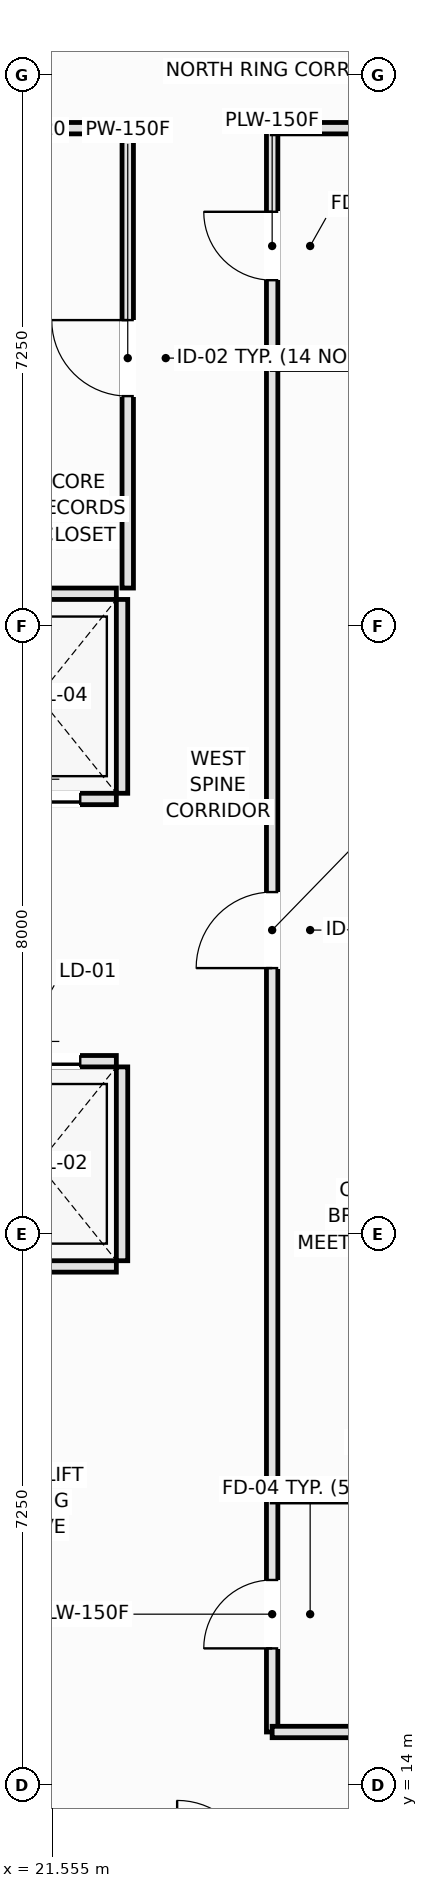
"""IFC4 building model, lengths in metres.
Left out: names, types, materials, properties, quantities, classifications, styles, units other than length and angle.
Written with IfcOpenShell. Run it as: python <this file> out.ifc"""

import sys

from ifc_helpers import new_model, si_unit, direction, frame, frame_2d, origin, place, context, subcontext, project, spatial, rectangle, extrude, element, fill, save


model = new_model("IFC4")
c1 = context("Model", 3, precision=1e-05, world=origin(), true_north=direction((0.0, 1.0)))
c2 = subcontext(c1, "Body", "Model", "MODEL_VIEW")
j1 = project(units=[si_unit("LENGTHUNIT", "METRE"), si_unit("PLANEANGLEUNIT", "RADIAN")], contexts=[c1])
p1 = place(None, origin())
s1 = spatial("IfcSite", under=j1, at=p1, CompositionType="ELEMENT")
p2 = place(p1, origin())
s2 = spatial("IfcBuilding", under=s1, at=p2, CompositionType="ELEMENT")
p3 = place(p2, frame((0.0, 0.0, 32.7)))
s3 = spatial("IfcBuildingStorey", under=s2, at=p3, CompositionType="ELEMENT", Elevation=32.7)
p4 = place(p3, frame((20.35, 20.825, 0.0), z_axis=(0.0, 0.0, 1.0), x_axis=(1.0, 0.0, 0.0)))
e1 = element("IfcWall", 1, at=p4, inside=s3, PredefinedType="PARTITIONING", context=c2, shape_type="SweptSolid", body=[
    extrude(rectangle(XDim=2.05, YDim=0.15, at=frame_2d((1.025, 0.0))), origin(), (0.0, 0.0, 1.0), 3.37),
])
p5 = place(p3, frame((20.35, 23.525, 0.0), z_axis=(0.0, 0.0, 1.0), x_axis=(1.0, 0.0, 0.0)))
e2 = element("IfcWall", 2, at=p5, inside=s3, PredefinedType="PARTITIONING", context=c2, shape_type="SweptSolid", body=[
    extrude(rectangle(XDim=2.05, YDim=0.15, at=frame_2d((1.025, 0.0))), origin(), (0.0, 0.0, 1.0), 3.37),
])
p6 = place(p5, frame((0.475, 0.0, 0.0)))
e3 = element("IfcOpeningElement", 3, at=p6, cuts=e2, PredefinedType="OPENING", context=c2, shape_type="SweptSolid", body=[
    extrude(rectangle(XDim=1.1, YDim=2.2, at=frame_2d((0.55, 1.1))), frame((0.0, 0.085, 0.0), z_axis=(0.0, -1.0, 0.0), x_axis=(1.0, 0.0, 0.0)), (0.0, 0.0, 1.0), 0.17),
])
p7 = place(p3, frame((22.475, 20.9, 0.0), z_axis=(0.0, 0.0, 1.0), x_axis=(0.0, 1.0, 0.0)))
e4 = element("IfcWall", 4, at=p7, inside=s3, PredefinedType="PARTITIONING", context=c2, shape_type="SweptSolid", body=[
    extrude(rectangle(XDim=2.55, YDim=0.15, at=frame_2d((1.275, 0.0))), origin(), (0.0, 0.0, 1.0), 3.37),
])
p8 = place(p3, frame((20.35, 26.975, 0.0), z_axis=(0.0, 0.0, 1.0), x_axis=(1.0, 0.0, 0.0)))
e5 = element("IfcWall", 5, at=p8, inside=s3, PredefinedType="PARTITIONING", context=c2, shape_type="SweptSolid", body=[
    extrude(rectangle(XDim=2.05, YDim=0.15, at=frame_2d((1.025, 0.0))), origin(), (0.0, 0.0, 1.0), 3.37),
])
p9 = place(p8, frame((0.475, 0.0, 0.0)))
e6 = element("IfcOpeningElement", 6, at=p9, cuts=e5, PredefinedType="OPENING", context=c2, shape_type="SweptSolid", body=[
    extrude(rectangle(XDim=1.1, YDim=2.2, at=frame_2d((0.55, 1.1))), frame((0.0, 0.085, 0.0), z_axis=(0.0, -1.0, 0.0), x_axis=(1.0, 0.0, 0.0)), (0.0, 0.0, 1.0), 0.17),
])
p10 = place(p3, frame((20.35, 29.675, 0.0), z_axis=(0.0, 0.0, 1.0), x_axis=(1.0, 0.0, 0.0)))
e7 = element("IfcWall", 7, at=p10, inside=s3, PredefinedType="PARTITIONING", context=c2, shape_type="SweptSolid", body=[
    extrude(rectangle(XDim=2.05, YDim=0.15, at=frame_2d((1.025, 0.0))), origin(), (0.0, 0.0, 1.0), 3.37),
])
p11 = place(p3, frame((22.475, 27.05, 0.0), z_axis=(0.0, 0.0, 1.0), x_axis=(0.0, 1.0, 0.0)))
e8 = element("IfcWall", 8, at=p11, inside=s3, PredefinedType="PARTITIONING", context=c2, shape_type="SweptSolid", body=[
    extrude(rectangle(XDim=2.55, YDim=0.15, at=frame_2d((1.275, 0.0))), origin(), (0.0, 0.0, 1.0), 3.37),
])
p12 = place(p3, frame((22.55, 29.75, 0.0), z_axis=(0.0, 0.0, 1.0), x_axis=(0.0, 1.0, 0.0)))
e9 = element("IfcWall", 9, at=p12, inside=s3, PredefinedType="PARTITIONING", context=c2, shape_type="SweptSolid", body=[
    extrude(rectangle(XDim=6.05, YDim=0.15, at=frame_2d((3.025, 0.0))), origin(), (0.0, 0.0, 1.0), 3.01),
])
p13 = place(p12, frame((2.525, 0.0, 0.0)))
e10 = element("IfcOpeningElement", 10, at=p13, cuts=e9, PredefinedType="OPENING", context=c2, shape_type="SweptSolid", body=[
    extrude(rectangle(XDim=1.0, YDim=2.15, at=frame_2d((0.5, 1.075))), frame((0.0, 0.085, 0.0), z_axis=(0.0, -1.0, 0.0), x_axis=(1.0, 0.0, 0.0)), (0.0, 0.0, 1.0), 0.17),
])
p14 = place(p3, frame((24.45, 14.7, 0.0), z_axis=(0.0, 0.0, 1.0), x_axis=(0.0, 1.0, 0.0)))
e11 = element("IfcWall", 11, at=p14, inside=s3, PredefinedType="PLUMBINGWALL", context=c2, shape_type="SweptSolid", body=[
    extrude(rectangle(XDim=3.1, YDim=0.15, at=frame_2d((1.55, 0.0))), origin(), (0.0, 0.0, 1.0), 3.37),
])
p15 = place(p14, frame((1.1, 0.0, 0.0)))
e12 = element("IfcOpeningElement", 12, at=p15, cuts=e11, PredefinedType="OPENING", context=c2, shape_type="SweptSolid", body=[
    extrude(rectangle(XDim=0.9, YDim=2.1, at=frame_2d((0.45, 1.05))), frame((0.0, 0.085, 0.0), z_axis=(0.0, -1.0, 0.0), x_axis=(1.0, 0.0, 0.0)), (0.0, 0.0, 1.0), 0.17),
])
p16 = place(p3, frame((24.45, 32.7, 0.0), z_axis=(0.0, 0.0, 1.0), x_axis=(0.0, 1.0, 0.0)))
e13 = element("IfcWall", 13, at=p16, inside=s3, PredefinedType="PLUMBINGWALL", context=c2, shape_type="SweptSolid", body=[
    extrude(rectangle(XDim=3.1, YDim=0.15, at=frame_2d((1.55, 0.0))), origin(), (0.0, 0.0, 1.0), 3.37),
])
p17 = place(p16, frame((1.1, 0.0, 0.0)))
e14 = element("IfcOpeningElement", 14, at=p17, cuts=e13, PredefinedType="OPENING", context=c2, shape_type="SweptSolid", body=[
    extrude(rectangle(XDim=0.9, YDim=2.1, at=frame_2d((0.45, 1.05))), frame((0.0, 0.085, 0.0), z_axis=(0.0, -1.0, 0.0), x_axis=(1.0, 0.0, 0.0)), (0.0, 0.0, 1.0), 0.17),
])
p18 = place(p3, frame((24.45, 17.8, 0.0), z_axis=(0.0, 0.0, 1.0), x_axis=(0.0, 1.0, 0.0)))
e15 = element("IfcWall", 15, at=p18, inside=s3, PredefinedType="PARTITIONING", context=c2, shape_type="SweptSolid", body=[
    extrude(rectangle(XDim=14.9, YDim=0.15, at=frame_2d((7.45, 0.0))), origin(), (0.0, 0.0, 1.0), 3.37),
])
p19 = place(p18, frame((6.95, 0.0, 0.0)))
e16 = element("IfcOpeningElement", 16, at=p19, cuts=e15, PredefinedType="OPENING", context=c2, shape_type="SweptSolid", body=[
    extrude(rectangle(XDim=1.0, YDim=2.15, at=frame_2d((0.5, 1.075))), frame((0.0, 0.085, 0.0), z_axis=(0.0, -1.0, 0.0), x_axis=(1.0, 0.0, 0.0)), (0.0, 0.0, 1.0), 0.17),
])
p20 = place(p3, frame((24.45, 14.7, 0.0), z_axis=(0.0, 0.0, 1.0), x_axis=(1.0, 0.0, 0.0)))
e17 = element("IfcWall", 17, at=p20, inside=s3, PredefinedType="PLUMBINGWALL", context=c2, shape_type="SweptSolid", body=[
    extrude(rectangle(XDim=3.15, YDim=0.15, at=frame_2d((1.575, 0.0))), origin(), (0.0, 0.0, 1.0), 3.37),
])
p21 = place(p3, frame((21.25, 35.8, 0.0), z_axis=(0.0, 0.0, 1.0), x_axis=(1.0, 0.0, 0.0)))
e18 = element("IfcWall", 18, at=p21, inside=s3, PredefinedType="PARTITIONING", context=c2, shape_type="SweptSolid", body=[
    extrude(rectangle(XDim=1.3, YDim=0.15, at=frame_2d((0.65, 0.0))), origin(), (0.0, 0.0, 1.0), 3.37),
])
p22 = place(p3, frame((24.45, 35.8, 0.0), z_axis=(0.0, 0.0, 1.0), x_axis=(1.0, 0.0, 0.0)))
e19 = element("IfcWall", 19, at=p22, inside=s3, PredefinedType="PLUMBINGWALL", context=c2, shape_type="SweptSolid", body=[
    extrude(rectangle(XDim=3.15, YDim=0.15, at=frame_2d((1.575, 0.0))), origin(), (0.0, 0.0, 1.0), 3.37),
])
for number, where, z_axis, x_axis in (
    (20, (24.45, 17.8, 0.0), (0.0, 0.0, 1.0), (1.0, 0.0, 0.0)),
    (21, (24.45, 32.7, 0.0), (0.0, 0.0, 1.0), (1.0, 0.0, 0.0)),
):
    element("IfcWall", number, at=place(p3, frame(where, z_axis=z_axis, x_axis=x_axis)), inside=s3, PredefinedType="PLUMBINGWALL", context=c2, shape_type="SweptSolid", body=[
        extrude(rectangle(XDim=3.05, YDim=0.15, at=frame_2d((1.525, 0.0))), origin(), (0.0, 0.0, 1.0), 3.37),
    ])
p23 = place(p6, origin())
e22 = element("IfcDoor", 22, at=p23, inside=s3, OperationType="DOUBLE_DOOR_SLIDING", PredefinedType="DOOR", context=c2, shape_type="SweptSolid", body=[
    extrude(rectangle(XDim=1.1, YDim=2.2, at=frame_2d((0.55, 1.1))), frame((0.0, 0.025, 0.0), z_axis=(0.0, -1.0, 0.0), x_axis=(1.0, 0.0, 0.0)), (0.0, 0.0, 1.0), 0.05),
])
fill(e3, e22)
p24 = place(p9, origin())
e23 = element("IfcDoor", 23, at=p24, inside=s3, OperationType="DOUBLE_DOOR_SLIDING", PredefinedType="DOOR", context=c2, shape_type="SweptSolid", body=[
    extrude(rectangle(XDim=1.1, YDim=2.2, at=frame_2d((0.55, 1.1))), frame((0.0, 0.025, 0.0), z_axis=(0.0, -1.0, 0.0), x_axis=(1.0, 0.0, 0.0)), (0.0, 0.0, 1.0), 0.05),
])
fill(e6, e23)
p25 = place(p13, origin())
e24 = element("IfcDoor", 24, at=p25, inside=s3, OperationType="SINGLE_SWING_RIGHT", PredefinedType="DOOR", context=c2, shape_type="SweptSolid", body=[
    extrude(rectangle(XDim=1.0, YDim=2.15, at=frame_2d((0.5, 1.075))), frame((0.0, 0.025, 0.0), z_axis=(0.0, -1.0, 0.0), x_axis=(1.0, 0.0, 0.0)), (0.0, 0.0, 1.0), 0.05),
])
fill(e10, e24)
p26 = place(p15, origin())
e25 = element("IfcDoor", 25, at=p26, inside=s3, OperationType="SINGLE_SWING_LEFT", PredefinedType="DOOR", context=c2, shape_type="SweptSolid", body=[
    extrude(rectangle(XDim=0.9, YDim=2.1, at=frame_2d((0.45, 1.05))), frame((0.0, 0.025, 0.0), z_axis=(0.0, -1.0, 0.0), x_axis=(1.0, 0.0, 0.0)), (0.0, 0.0, 1.0), 0.05),
])
fill(e12, e25)
p27 = place(p17, origin())
e26 = element("IfcDoor", 26, at=p27, inside=s3, OperationType="SINGLE_SWING_RIGHT", PredefinedType="DOOR", context=c2, shape_type="SweptSolid", body=[
    extrude(rectangle(XDim=0.9, YDim=2.1, at=frame_2d((0.45, 1.05))), frame((0.0, 0.025, 0.0), z_axis=(0.0, -1.0, 0.0), x_axis=(1.0, 0.0, 0.0)), (0.0, 0.0, 1.0), 0.05),
])
fill(e14, e26)
p28 = place(p19, origin())
e27 = element("IfcDoor", 27, at=p28, inside=s3, OperationType="SINGLE_SWING_LEFT", PredefinedType="DOOR", context=c2, shape_type="SweptSolid", body=[
    extrude(rectangle(XDim=1.0, YDim=2.15, at=frame_2d((0.5, 1.075))), frame((0.0, 0.025, 0.0), z_axis=(0.0, -1.0, 0.0), x_axis=(1.0, 0.0, 0.0)), (0.0, 0.0, 1.0), 0.05),
])
fill(e16, e27)
save(model, sys.argv[1])
